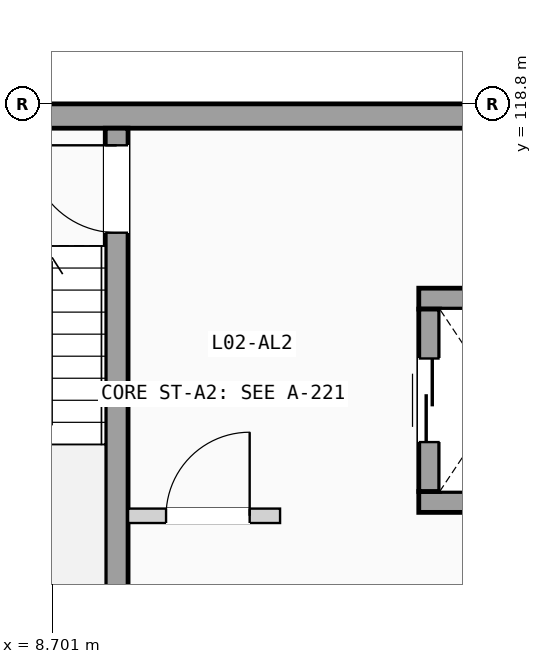
"""IFC4 building model, lengths in metres.
Left out: names, types, materials, properties, quantities, classifications, styles, units other than length and angle.
Written with IfcOpenShell. Run it as: python <this file> out.ifc"""

import sys

from ifc_helpers import new_model, si_unit, direction, frame, frame_2d, origin, place, context, subcontext, project, spatial, rectangle, extrude, element, fill, save


model = new_model("IFC4")
c1 = context("Model", 3, precision=1e-05, world=origin(), true_north=direction((0.0, 1.0)))
c2 = subcontext(c1, "Body", "Model", "MODEL_VIEW")
j1 = project(units=[si_unit("LENGTHUNIT", "METRE"), si_unit("PLANEANGLEUNIT", "RADIAN")], contexts=[c1])
p1 = place(None, origin())
s1 = spatial("IfcSite", under=j1, at=p1, CompositionType="ELEMENT")
p2 = place(p1, origin())
s2 = spatial("IfcBuilding", under=s1, at=p2, CompositionType="ELEMENT")
p3 = place(p2, frame((0.0, 0.0, 8.575)))
s3 = spatial("IfcBuildingStorey", under=s2, at=p3, CompositionType="ELEMENT", Elevation=8.575)
p4 = place(p3, frame((0.0, 118.64, 0.0), z_axis=(0.0, 0.0, 1.0), x_axis=(1.0, 0.0, 0.0)))
e1 = element("IfcWall", 1, at=p4, inside=s3, PredefinedType="SOLIDWALL", context=c2, shape_type="SweptSolid", body=[
    extrude(rectangle(XDim=21.6, YDim=0.32, at=frame_2d((10.8, 0.0))), origin(), (0.0, 0.0, 1.0), 3.24),
])
p5 = place(p3, frame((9.55, 111.48, 0.0), z_axis=(0.0, 0.0, 1.0), x_axis=(0.0, 1.0, 0.0)))
e2 = element("IfcWall", 2, at=p5, inside=s3, PredefinedType="SHEAR", context=c2, shape_type="SweptSolid", body=[
    extrude(rectangle(XDim=7.0, YDim=0.3, at=frame_2d((3.5, 0.0))), origin(), (0.0, 0.0, 1.0), 3.24),
])
p6 = place(p5, frame((5.625, 0.0, 0.0)))
e3 = element("IfcOpeningElement", 3, at=p6, cuts=e2, PredefinedType="OPENING", context=c2, shape_type="SweptSolid", body=[
    extrude(rectangle(XDim=1.15, YDim=2.12, at=frame_2d((0.575, 1.06))), frame((0.0, 0.16, 0.0), z_axis=(0.0, -1.0, 0.0), x_axis=(1.0, 0.0, 0.0)), (0.0, 0.0, 1.0), 0.32),
])
for number, where, z_axis, x_axis in (
    (4, (13.525, 113.562, 0.0), (0.0, 0.0, 1.0), (1.0, 0.0, 0.0)),
    (5, (13.525, 116.238, 0.0), (0.0, 0.0, 1.0), (1.0, 0.0, 0.0)),
):
    element("IfcWall", number, at=place(p3, frame(where, z_axis=z_axis, x_axis=x_axis)), inside=s3, PredefinedType="SHEAR", context=c2, shape_type="SweptSolid", body=[
        extrude(rectangle(XDim=2.15, YDim=0.275, at=frame_2d((1.075, 0.0))), origin(), (0.0, 0.0, 1.0), 3.24),
    ])
p7 = place(p3, frame((13.663, 113.7, 0.0), z_axis=(0.0, 0.0, 1.0), x_axis=(0.0, 1.0, 0.0)))
e6 = element("IfcWall", 6, at=p7, inside=s3, PredefinedType="SHEAR", context=c2, shape_type="SweptSolid", body=[
    extrude(rectangle(XDim=2.4, YDim=0.275, at=frame_2d((1.2, 0.0))), origin(), (0.0, 0.0, 1.0), 3.24),
])
p8 = place(p7, frame((0.65, 0.0, 0.0)))
e7 = element("IfcOpeningElement", 7, at=p8, cuts=e6, PredefinedType="OPENING", context=c2, shape_type="SweptSolid", body=[
    extrude(rectangle(XDim=1.1, YDim=2.15, at=frame_2d((0.55, 1.075))), frame((0.0, 0.147, 0.0), z_axis=(0.0, -1.0, 0.0), x_axis=(1.0, 0.0, 0.0)), (0.0, 0.0, 1.0), 0.295),
])
p9 = place(p3, frame((9.7, 113.38, 0.0), z_axis=(0.0, 0.0, 1.0), x_axis=(1.0, 0.0, 0.0)))
e8 = element("IfcWall", 8, at=p9, inside=s3, PredefinedType="PARTITIONING", context=c2, shape_type="SweptSolid", body=[
    extrude(rectangle(XDim=2.0, YDim=0.19, at=frame_2d((1.0, 0.0))), origin(), (0.0, 0.0, 1.0), 3.22),
])
p10 = place(p9, frame((0.5, 0.0, 0.0)))
e9 = element("IfcOpeningElement", 9, at=p10, cuts=e8, PredefinedType="OPENING", context=c2, shape_type="SweptSolid", body=[
    extrude(rectangle(XDim=1.1, YDim=2.12, at=frame_2d((0.55, 1.06))), frame((0.0, 0.105, 0.0), z_axis=(0.0, -1.0, 0.0), x_axis=(1.0, 0.0, 0.0)), (0.0, 0.0, 1.0), 0.21),
])
p11 = place(p6, origin())
e10 = element("IfcDoor", 10, at=p11, inside=s3, OperationType="SINGLE_SWING_RIGHT", PredefinedType="DOOR", context=c2, shape_type="SweptSolid", body=[
    extrude(rectangle(XDim=1.15, YDim=2.12, at=frame_2d((0.575, 1.06))), frame((0.0, 0.025, 0.0), z_axis=(0.0, -1.0, 0.0), x_axis=(1.0, 0.0, 0.0)), (0.0, 0.0, 1.0), 0.05),
])
fill(e3, e10)
p12 = place(p8, origin())
e11 = element("IfcDoor", 11, at=p12, inside=s3, OperationType="SLIDING_TO_LEFT", PredefinedType="DOOR", context=c2, shape_type="SweptSolid", body=[
    extrude(rectangle(XDim=1.1, YDim=2.15, at=frame_2d((0.55, 1.075))), frame((0.0, 0.025, 0.0), z_axis=(0.0, -1.0, 0.0), x_axis=(1.0, 0.0, 0.0)), (0.0, 0.0, 1.0), 0.05),
])
fill(e7, e11)
p13 = place(p10, origin())
e12 = element("IfcDoor", 12, at=p13, inside=s3, OperationType="SINGLE_SWING_RIGHT", PredefinedType="DOOR", context=c2, shape_type="SweptSolid", body=[
    extrude(rectangle(XDim=1.1, YDim=2.12, at=frame_2d((0.55, 1.06))), frame((0.0, 0.025, 0.0), z_axis=(0.0, -1.0, 0.0), x_axis=(1.0, 0.0, 0.0)), (0.0, 0.0, 1.0), 0.05),
])
fill(e9, e12)
save(model, sys.argv[1])
